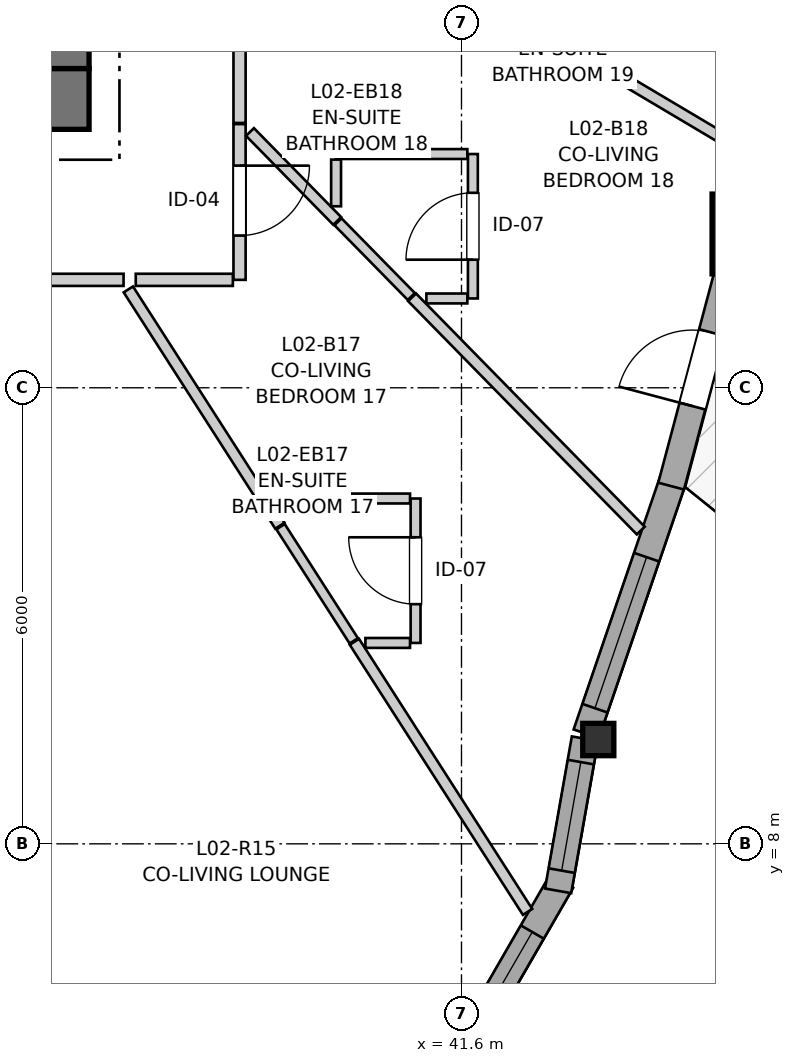
"""IFC4 building model, lengths in metres.
Left out: names, types, materials, properties, quantities, classifications, styles, units other than length and angle.
Written with IfcOpenShell. Run it as: python <this file> out.ifc"""

import sys

from ifc_helpers import new_model, si_unit, direction, frame, frame_2d, origin, origin_2d, place, context, subcontext, project, spatial, rectangle, i_section, extrude, source, transform, mapped, element, fill, save


model = new_model("IFC4")
c1 = context("Model", 3, precision=1e-05, world=origin(), true_north=direction((0.0, 1.0)))
c2 = subcontext(c1, "Body", "Model", "MODEL_VIEW")
j1 = project(units=[si_unit("LENGTHUNIT", "METRE"), si_unit("PLANEANGLEUNIT", "RADIAN")], contexts=[c1])
p1 = place(None, origin())
s1 = spatial("IfcSite", under=j1, at=p1, CompositionType="ELEMENT")
p2 = place(p1, origin())
s2 = spatial("IfcBuilding", under=s1, at=p2, CompositionType="ELEMENT")
p3 = place(p2, frame((0.0, 0.0, 11.0)))
s3 = spatial("IfcBuildingStorey", under=s2, at=p3, CompositionType="ELEMENT", Elevation=11.0)
p4 = place(p3, frame((24.0, 17.8, 0.0), z_axis=(0.0, 0.0, 1.0), x_axis=(1.0, 0.0, 0.0)))
e1 = element("IfcWall", 1, at=p4, inside=s3, PredefinedType="SHEAR", context=c2, shape_type="SweptSolid", body=[
    extrude(rectangle(XDim=12.7, YDim=0.8, at=frame_2d((6.35, 0.0))), origin(), (0.0, 0.0, 1.0), 2.94),
])
p5 = place(p3, frame((36.3, 18.2, 0.0), z_axis=(0.0, 0.0, 1.0), x_axis=(0.0, 1.0, 0.0)))
e2 = element("IfcWall", 2, at=p5, inside=s3, PredefinedType="SHEAR", context=c2, shape_type="SweptSolid", body=[
    extrude(rectangle(XDim=15.6, YDim=0.8, at=frame_2d((7.8, 0.0))), origin(), (0.0, 0.0, 1.0), 2.94),
])
p6 = place(p5, frame((4.25, 0.0, 0.0)))
e3 = element("IfcOpeningElement", 3, at=p6, cuts=e2, PredefinedType="OPENING", context=c2, shape_type="SweptSolid", body=[
    extrude(rectangle(XDim=1.1, YDim=2.15, at=frame_2d((0.55, 1.075))), frame((0.0, 0.41, 0.0), z_axis=(0.0, -1.0, 0.0), x_axis=(1.0, 0.0, 0.0)), (0.0, 0.0, 1.0), 0.82),
])
p7 = place(p5, frame((10.25, 0.0, 0.0)))
e4 = element("IfcOpeningElement", 4, at=p7, cuts=e2, PredefinedType="OPENING", context=c2, shape_type="SweptSolid", body=[
    extrude(rectangle(XDim=1.1, YDim=2.15, at=frame_2d((0.55, 1.075))), frame((0.0, 0.41, 0.0), z_axis=(0.0, -1.0, 0.0), x_axis=(1.0, 0.0, 0.0)), (0.0, 0.0, 1.0), 0.82),
])
m1 = source(origin(), c2, "Body", "SweptSolid", [
    extrude(i_section(OverallWidth=0.409, OverallDepth=0.425, WebThickness=0.03, FlangeThickness=0.048, FilletRadius=0.015, at=origin_2d()), origin(), (0.0, 0.0, 1.0), 2.94),
])
p8 = place(p3, frame((43.4, 9.372, 0.0), z_axis=(0.0, 0.0, 1.0), x_axis=(1.0, 0.0, 0.0)))
e5 = element("IfcColumn", 5, at=p8, inside=s3, PredefinedType="PILASTER", context=c2, shape_type="MappedRepresentation", body=[
    mapped(m1, transform((0.0, 0.0, 0.0), x_axis=(1.0, 0.0, 0.0), y_axis=(0.0, 1.0, 0.0), z_axis=(0.0, 0.0, 1.0), scale=1.0)),
])
m2 = source(origin(), c2, "Body", "SweptSolid", [
    extrude(rectangle(XDim=1.05, YDim=1.05, at=origin_2d()), origin(), (0.0, 0.0, 1.0), 2.94),
])
p9 = place(p3, frame((45.422, 16.023, 0.0), z_axis=(0.0, 0.0, 1.0), x_axis=(1.0, 0.0, 0.0)))
e6 = element("IfcColumn", 6, at=p9, inside=s3, PredefinedType="COLUMN", context=c2, shape_type="MappedRepresentation", body=[
    mapped(m2, transform((0.0, 0.0, 0.0), x_axis=(1.0, 0.0, 0.0), y_axis=(0.0, 1.0, 0.0), z_axis=(0.0, 0.0, 1.0), scale=1.0)),
])
p10 = place(p3, frame((41.873, 5.699, 0.0), z_axis=(0.0, 0.0, 1.0), x_axis=(0.49990781971, 0.866078617559, 0.0)))
e7 = element("IfcWall", 7, at=p10, inside=s3, PredefinedType="SOLIDWALL", context=c2, shape_type="SweptSolid", body=[
    extrude(rectangle(XDim=2.09, YDim=0.35, at=frame_2d((1.045, 0.0))), origin(), (0.0, 0.0, 1.0), 2.42),
])
p11 = place(p10, frame((0.268, 0.0, 0.82)))
e8 = element("IfcOpeningElement", 8, at=p11, cuts=e7, PredefinedType="OPENING", context=c2, shape_type="SweptSolid", body=[
    extrude(rectangle(XDim=1.05, YDim=1.45, at=frame_2d((0.525, 0.725))), frame((0.0, 0.185, 0.0), z_axis=(0.0, -1.0, 0.0), x_axis=(1.0, 0.0, 0.0)), (0.0, 0.0, 1.0), 0.37),
])
p12 = place(p3, frame((42.871, 7.382, 0.0), z_axis=(0.0, 0.0, 1.0), x_axis=(0.173586593252, 0.984818610021, 0.0)))
e9 = element("IfcWall", 9, at=p12, inside=s3, PredefinedType="SOLIDWALL", context=c2, shape_type="SweptSolid", body=[
    extrude(rectangle(XDim=2.032, YDim=0.35, at=frame_2d((1.016, 0.0))), origin(), (0.0, 0.0, 1.0), 2.42),
])
p13 = place(p12, frame((0.27, 0.0, 0.82)))
e10 = element("IfcOpeningElement", 10, at=p13, cuts=e9, PredefinedType="OPENING", context=c2, shape_type="SweptSolid", body=[
    extrude(rectangle(XDim=1.45, YDim=1.25, at=frame_2d((0.725, 0.625))), frame((0.0, 0.185, 0.0), z_axis=(0.0, -1.0, 0.0), x_axis=(1.0, 0.0, 0.0)), (0.0, 0.0, 1.0), 0.37),
])
p14 = place(p3, frame((43.241, 9.448, 0.0), z_axis=(0.0, 0.0, 1.0), x_axis=(0.323599751171, 0.946194060984, 0.0)))
e11 = element("IfcWall", 11, at=p14, inside=s3, PredefinedType="SOLIDWALL", context=c2, shape_type="SweptSolid", body=[
    extrude(rectangle(XDim=3.532, YDim=0.35, at=frame_2d((1.766, 0.0))), origin(), (0.0, 0.0, 1.0), 2.42),
])
p15 = place(p14, frame((0.356, 0.0, 0.82)))
e12 = element("IfcOpeningElement", 12, at=p15, cuts=e11, PredefinedType="OPENING", context=c2, shape_type="SweptSolid", body=[
    extrude(rectangle(XDim=2.1, YDim=1.4, at=frame_2d((1.05, 0.7))), frame((0.0, 0.185, 0.0), z_axis=(0.0, -1.0, 0.0), x_axis=(1.0, 0.0, 0.0)), (0.0, 0.0, 1.0), 0.37),
])
p16 = place(p3, frame((44.358, 12.706, 0.0), z_axis=(0.0, 0.0, 1.0), x_axis=(0.25708907847, 0.966387709841, 0.0)))
e13 = element("IfcWall", 13, at=p16, inside=s3, PredefinedType="SOLIDWALL", context=c2, shape_type="SweptSolid", body=[
    extrude(rectangle(XDim=3.179, YDim=0.35, at=frame_2d((1.59, 0.0))), origin(), (0.0, 0.0, 1.0), 2.42),
])
p17 = place(p16, frame((1.09, 0.0, 0.0)))
e14 = element("IfcOpeningElement", 14, at=p17, cuts=e13, PredefinedType="OPENING", context=c2, shape_type="SweptSolid", body=[
    extrude(rectangle(XDim=1.0, YDim=2.1, at=frame_2d((0.5, 1.05))), frame((0.0, 0.185, 0.0), z_axis=(0.0, -1.0, 0.0), x_axis=(1.0, 0.0, 0.0)), (0.0, 0.0, 1.0), 0.37),
])
p18 = place(p3, frame((37.154, 15.42, 0.0), z_axis=(0.0, 0.0, 1.0), x_axis=(-1.0, 0.0, 0.0)))
e15 = element("IfcWall", 15, at=p18, inside=s3, PredefinedType="PARTITIONING", context=c2, shape_type="SweptSolid", body=[
    extrude(rectangle(XDim=3.774, YDim=0.16, at=frame_2d((1.887, 0.0))), origin(), (0.0, 0.0, 1.0), 2.94),
])
p19 = place(p18, frame((1.239, 0.0, 0.0)))
e16 = element("IfcOpeningElement", 16, at=p19, cuts=e15, PredefinedType="OPENING", context=c2, shape_type="SweptSolid", body=[
    extrude(rectangle(XDim=1.3, YDim=2.1, at=frame_2d((0.65, 1.05))), frame((0.0, 0.09, 0.0), z_axis=(0.0, -1.0, 0.0), x_axis=(1.0, 0.0, 0.0)), (0.0, 0.0, 1.0), 0.18),
])
p20 = place(p3, frame((38.68, 21.073, 0.0), z_axis=(0.0, 0.0, 1.0), x_axis=(0.0, -1.0, 0.0)))
e17 = element("IfcWall", 17, at=p20, inside=s3, PredefinedType="PARTITIONING", context=c2, shape_type="SweptSolid", body=[
    extrude(rectangle(XDim=3.589, YDim=0.16, at=frame_2d((1.794, 0.0))), origin(), (0.0, 0.0, 1.0), 2.94),
])
p21 = place(p20, frame((1.333, 0.0, 0.0)))
e18 = element("IfcOpeningElement", 18, at=p21, cuts=e17, PredefinedType="OPENING", context=c2, shape_type="SweptSolid", body=[
    extrude(rectangle(XDim=0.92, YDim=2.1, at=frame_2d((0.46, 1.05))), frame((0.0, 0.09, 0.0), z_axis=(0.0, -1.0, 0.0), x_axis=(1.0, 0.0, 0.0)), (0.0, 0.0, 1.0), 0.18),
])
p22 = place(p3, frame((38.68, 17.469, 0.0), z_axis=(0.0, 0.0, 1.0), x_axis=(0.0, -1.0, 0.0)))
e19 = element("IfcWall", 19, at=p22, inside=s3, PredefinedType="PARTITIONING", context=c2, shape_type="SweptSolid", body=[
    extrude(rectangle(XDim=2.049, YDim=0.16, at=frame_2d((1.024, 0.0))), origin(), (0.0, 0.0, 1.0), 2.94),
])
p23 = place(p22, frame((0.546, 0.0, 0.0)))
e20 = element("IfcOpeningElement", 20, at=p23, cuts=e19, PredefinedType="OPENING", context=c2, shape_type="SweptSolid", body=[
    extrude(rectangle(XDim=0.92, YDim=2.1, at=frame_2d((0.46, 1.05))), frame((0.0, 0.09, 0.0), z_axis=(0.0, -1.0, 0.0), x_axis=(1.0, 0.0, 0.0)), (0.0, 0.0, 1.0), 0.18),
])
p24 = place(p3, frame((40.996, 10.643, 0.0), z_axis=(0.0, 0.0, 1.0), x_axis=(0.0, 1.0, 0.0)))
e21 = element("IfcWall", 21, at=p24, inside=s3, PredefinedType="PARTITIONING", context=c2, shape_type="SweptSolid", body=[
    extrude(rectangle(XDim=1.9, YDim=0.13, at=frame_2d((0.95, 0.0))), origin(), (0.0, 0.0, 1.0), 2.94),
])
p25 = place(p24, frame((0.51, 0.0, 0.0)))
e22 = element("IfcOpeningElement", 22, at=p25, cuts=e21, PredefinedType="OPENING", context=c2, shape_type="SweptSolid", body=[
    extrude(rectangle(XDim=0.88, YDim=2.05, at=frame_2d((0.44, 1.025))), frame((0.0, 0.075, 0.0), z_axis=(0.0, -1.0, 0.0), x_axis=(1.0, 0.0, 0.0)), (0.0, 0.0, 1.0), 0.15),
])
p26 = place(p3, frame((41.75, 15.175, 0.0), z_axis=(0.0, 0.0, 1.0), x_axis=(0.0, 1.0, 0.0)))
e23 = element("IfcWall", 23, at=p26, inside=s3, PredefinedType="PARTITIONING", context=c2, shape_type="SweptSolid", body=[
    extrude(rectangle(XDim=1.9, YDim=0.13, at=frame_2d((0.95, 0.0))), origin(), (0.0, 0.0, 1.0), 2.94),
])
p27 = place(p26, frame((0.51, 0.0, 0.0)))
e24 = element("IfcOpeningElement", 24, at=p27, cuts=e23, PredefinedType="OPENING", context=c2, shape_type="SweptSolid", body=[
    extrude(rectangle(XDim=0.88, YDim=2.05, at=frame_2d((0.44, 1.025))), frame((0.0, 0.075, 0.0), z_axis=(0.0, -1.0, 0.0), x_axis=(1.0, 0.0, 0.0)), (0.0, 0.0, 1.0), 0.15),
])
p28 = place(p3, frame((33.426, 15.312, 0.0), z_axis=(0.0, 0.0, 1.0), x_axis=(0.276606114731, -0.960983380342, 0.0)))
e25 = element("IfcWall", 25, at=p28, inside=s3, PredefinedType="PARTITIONING", context=c2, shape_type="SweptSolid", body=[
    extrude(rectangle(XDim=11.749, YDim=0.145, at=frame_2d((5.875, 0.0))), origin(), (0.0, 0.0, 1.0), 2.94),
])
p29 = place(p3, frame((40.95, 15.19, 0.0), z_axis=(0.0, 0.0, 1.0), x_axis=(0.700142401903, -0.714003233226, 0.0)))
e26 = element("IfcWall", 26, at=p29, inside=s3, PredefinedType="PARTITIONING", context=c2, shape_type="SweptSolid", body=[
    extrude(rectangle(XDim=4.298, YDim=0.145, at=frame_2d((2.149, 0.0))), origin(), (0.0, 0.0, 1.0), 2.94),
])
p30 = place(p3, frame((40.191, 10.658, 0.0), z_axis=(0.0, 0.0, 1.0), x_axis=(0.539757550566, -0.841820519236, 0.0)))
e27 = element("IfcWall", 27, at=p30, inside=s3, PredefinedType="PARTITIONING", context=c2, shape_type="SweptSolid", body=[
    extrude(rectangle(XDim=4.221, YDim=0.145, at=frame_2d((2.111, 0.0))), origin(), (0.0, 0.0, 1.0), 2.94),
])
p31 = place(p3, frame((37.217, 15.294, 0.0), z_axis=(0.0, 0.0, 1.0), x_axis=(0.539878709929, -0.841742822105, 0.0)))
e28 = element("IfcWall", 28, at=p31, inside=s3, PredefinedType="PARTITIONING", context=c2, shape_type="SweptSolid", body=[
    extrude(rectangle(XDim=3.694, YDim=0.145, at=frame_2d((1.847, 0.0))), origin(), (0.0, 0.0, 1.0), 2.94),
])
p32 = place(p3, frame((42.848, 18.581, 0.0), z_axis=(0.0, 0.0, 1.0), x_axis=(0.859872599939, -0.510508679528, 0.0)))
e29 = element("IfcWall", 29, at=p32, inside=s3, PredefinedType="PARTITIONING", context=c2, shape_type="SweptSolid", body=[
    extrude(rectangle(XDim=2.813, YDim=0.145, at=frame_2d((1.407, 0.0))), origin(), (0.0, 0.0, 1.0), 2.94),
])
p33 = place(p3, frame((38.817, 17.365, 0.0), z_axis=(0.0, 0.0, 1.0), x_axis=(0.70029627305, -0.713852316626, 0.0)))
e30 = element("IfcWall", 30, at=p33, inside=s3, PredefinedType="PARTITIONING", context=c2, shape_type="SweptSolid", body=[
    extrude(rectangle(XDim=1.639, YDim=0.145, at=frame_2d((0.819, 0.0))), origin(), (0.0, 0.0, 1.0), 2.94),
])
for number, where, z_axis, x_axis in (
    (31, (39.196, 12.543, 0.0), (0.0, 0.0, 1.0), (1.0, 0.0, 0.0)),
    (32, (39.95, 17.075, 0.0), (0.0, 0.0, 1.0), (1.0, 0.0, 0.0)),
):
    element("IfcWall", number, at=place(p3, frame(where, z_axis=z_axis, x_axis=x_axis)), inside=s3, PredefinedType="PARTITIONING", context=c2, shape_type="SweptSolid", body=[
        extrude(rectangle(XDim=1.727, YDim=0.13, at=frame_2d((0.864, 0.0))), origin(), (0.0, 0.0, 1.0), 2.94),
    ])
p34 = place(p3, frame((39.219, 12.172, 0.0), z_axis=(0.0, 0.0, 1.0), x_axis=(0.539899826285, -0.84172927808, 0.0)))
e33 = element("IfcWall", 33, at=p34, inside=s3, PredefinedType="PARTITIONING", context=c2, shape_type="SweptSolid", body=[
    extrude(rectangle(XDim=1.784, YDim=0.13, at=frame_2d((0.892, 0.0))), origin(), (0.0, 0.0, 1.0), 2.94),
])
p35 = place(p3, frame((37.314, 15.42, 0.0), z_axis=(0.0, 0.0, 1.0), x_axis=(1.0, 0.0, 0.0)))
e34 = element("IfcWall", 34, at=p35, inside=s3, PredefinedType="PARTITIONING", context=c2, shape_type="SweptSolid", body=[
    extrude(rectangle(XDim=1.278, YDim=0.16, at=frame_2d((0.639, 0.0))), origin(), (0.0, 0.0, 1.0), 2.94),
])
p36 = place(p3, frame((39.975, 16.184, 0.0), z_axis=(0.0, 0.0, 1.0), x_axis=(0.700338966049, -0.713810431861, 0.0)))
e35 = element("IfcWall", 35, at=p36, inside=s3, PredefinedType="PARTITIONING", context=c2, shape_type="SweptSolid", body=[
    extrude(rectangle(XDim=1.377, YDim=0.13, at=frame_2d((0.689, 0.0))), origin(), (0.0, 0.0, 1.0), 2.94),
])
p37 = place(p3, frame((39.95, 16.388, 0.0), z_axis=(0.0, 0.0, 1.0), x_axis=(0.0, 1.0, 0.0)))
e36 = element("IfcWall", 36, at=p37, inside=s3, PredefinedType="PARTITIONING", context=c2, shape_type="SweptSolid", body=[
    extrude(rectangle(XDim=0.614, YDim=0.13, at=frame_2d((0.307, 0.0))), origin(), (0.0, 0.0, 1.0), 2.94),
])
p38 = place(p3, frame((40.336, 10.643, 0.0), z_axis=(0.0, 0.0, 1.0), x_axis=(1.0, 0.0, 0.0)))
e37 = element("IfcWall", 37, at=p38, inside=s3, PredefinedType="PARTITIONING", context=c2, shape_type="SweptSolid", body=[
    extrude(rectangle(XDim=0.587, YDim=0.13, at=frame_2d((0.294, 0.0))), origin(), (0.0, 0.0, 1.0), 2.94),
])
p39 = place(p3, frame((41.138, 15.175, 0.0), z_axis=(0.0, 0.0, 1.0), x_axis=(1.0, 0.0, 0.0)))
e38 = element("IfcWall", 38, at=p39, inside=s3, PredefinedType="PARTITIONING", context=c2, shape_type="SweptSolid", body=[
    extrude(rectangle(XDim=0.539, YDim=0.13, at=frame_2d((0.27, 0.0))), origin(), (0.0, 0.0, 1.0), 2.94),
])
m3 = source(origin(), c2, "Body", "SweptSolid", [
    extrude(rectangle(XDim=1.05, YDim=1.45, at=frame_2d((0.525, 0.725))), frame((0.0, 0.03, 0.0), z_axis=(0.0, -1.0, 0.0), x_axis=(1.0, 0.0, 0.0)), (0.0, 0.0, 1.0), 0.06),
])
p40 = place(p11, origin())
e39 = element("IfcWindow", 39, at=p40, inside=s3, PartitioningType="SINGLE_PANEL", PredefinedType="WINDOW", context=c2, shape_type="MappedRepresentation", body=[
    mapped(m3, transform((0.0, 0.0, 0.0), x_axis=(1.0, 0.0, 0.0), y_axis=(0.0, 1.0, 0.0), z_axis=(0.0, 0.0, 1.0), scale=1.0)),
])
fill(e8, e39)
m4 = source(origin(), c2, "Body", "SweptSolid", [
    extrude(rectangle(XDim=1.45, YDim=1.25, at=frame_2d((0.725, 0.625))), frame((0.0, 0.03, 0.0), z_axis=(0.0, -1.0, 0.0), x_axis=(1.0, 0.0, 0.0)), (0.0, 0.0, 1.0), 0.06),
])
p41 = place(p13, origin())
e40 = element("IfcWindow", 40, at=p41, inside=s3, PartitioningType="SINGLE_PANEL", PredefinedType="WINDOW", context=c2, shape_type="MappedRepresentation", body=[
    mapped(m4, transform((0.0, 0.0, 0.0), x_axis=(1.0, 0.0, 0.0), y_axis=(0.0, 1.0, 0.0), z_axis=(0.0, 0.0, 1.0), scale=1.0)),
])
fill(e10, e40)
m5 = source(origin(), c2, "Body", "SweptSolid", [
    extrude(rectangle(XDim=2.1, YDim=1.4, at=frame_2d((1.05, 0.7))), frame((0.0, 0.03, 0.0), z_axis=(0.0, -1.0, 0.0), x_axis=(1.0, 0.0, 0.0)), (0.0, 0.0, 1.0), 0.06),
])
p42 = place(p15, origin())
e41 = element("IfcWindow", 41, at=p42, inside=s3, PartitioningType="SINGLE_PANEL", PredefinedType="WINDOW", context=c2, shape_type="MappedRepresentation", body=[
    mapped(m5, transform((0.0, 0.0, 0.0), x_axis=(1.0, 0.0, 0.0), y_axis=(0.0, 1.0, 0.0), z_axis=(0.0, 0.0, 1.0), scale=1.0)),
])
fill(e12, e41)
m6 = source(origin(), c2, "Body", "SweptSolid", [
    extrude(rectangle(XDim=1.0, YDim=2.1, at=frame_2d((0.5, 1.05))), frame((0.0, 0.025, 0.0), z_axis=(0.0, -1.0, 0.0), x_axis=(1.0, 0.0, 0.0)), (0.0, 0.0, 1.0), 0.05),
])
p43 = place(p17, origin())
e42 = element("IfcDoor", 42, at=p43, inside=s3, OperationType="SINGLE_SWING_LEFT", PredefinedType="DOOR", context=c2, shape_type="MappedRepresentation", body=[
    mapped(m6, transform((0.0, 0.0, 0.0), x_axis=(1.0, 0.0, 0.0), y_axis=(0.0, 1.0, 0.0), z_axis=(0.0, 0.0, 1.0), scale=1.0)),
])
fill(e14, e42)
m7 = source(origin(), c2, "Body", "SweptSolid", [
    extrude(rectangle(XDim=0.92, YDim=2.1, at=frame_2d((0.46, 1.05))), frame((0.0, 0.025, 0.0), z_axis=(0.0, -1.0, 0.0), x_axis=(1.0, 0.0, 0.0)), (0.0, 0.0, 1.0), 0.05),
])
p44 = place(p23, origin())
e43 = element("IfcDoor", 43, at=p44, inside=s3, OperationType="SINGLE_SWING_LEFT", PredefinedType="DOOR", context=c2, shape_type="MappedRepresentation", body=[
    mapped(m7, transform((0.0, 0.0, 0.0), x_axis=(1.0, 0.0, 0.0), y_axis=(0.0, 1.0, 0.0), z_axis=(0.0, 0.0, 1.0), scale=1.0)),
])
fill(e20, e43)
m8 = source(origin(), c2, "Body", "SweptSolid", [
    extrude(rectangle(XDim=0.88, YDim=2.05, at=frame_2d((0.44, 1.025))), frame((0.0, 0.025, 0.0), z_axis=(0.0, -1.0, 0.0), x_axis=(1.0, 0.0, 0.0)), (0.0, 0.0, 1.0), 0.05),
])
p45 = place(p25, origin())
e44 = element("IfcDoor", 44, at=p45, inside=s3, OperationType="SINGLE_SWING_RIGHT", PredefinedType="DOOR", context=c2, shape_type="MappedRepresentation", body=[
    mapped(m8, transform((0.0, 0.0, 0.0), x_axis=(1.0, 0.0, 0.0), y_axis=(0.0, 1.0, 0.0), z_axis=(0.0, 0.0, 1.0), scale=1.0)),
])
fill(e22, e44)
p46 = place(p27, origin())
e45 = element("IfcDoor", 45, at=p46, inside=s3, OperationType="SINGLE_SWING_LEFT", PredefinedType="DOOR", context=c2, shape_type="MappedRepresentation", body=[
    mapped(m8, transform((0.0, 0.0, 0.0), x_axis=(1.0, 0.0, 0.0), y_axis=(0.0, 1.0, 0.0), z_axis=(0.0, 0.0, 1.0), scale=1.0)),
])
fill(e24, e45)
save(model, sys.argv[1])
